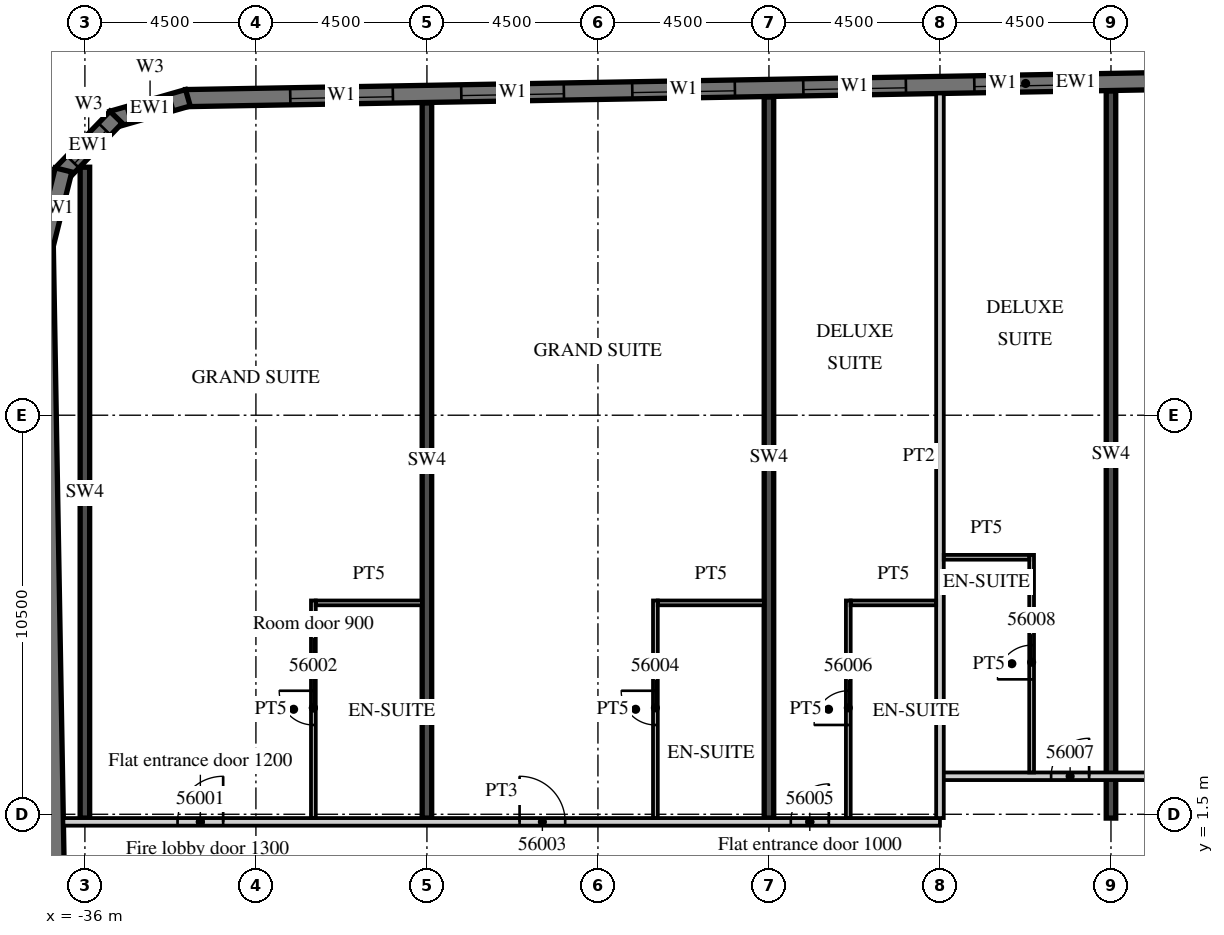
"""IFC4 building model, lengths in metres.
Left out: names, types, materials, properties, quantities, classifications, styles, units other than length and angle.
Written with IfcOpenShell. Run it as: python <this file> out.ifc"""

import sys

from ifc_helpers import new_model, si_unit, direction, frame, frame_2d, origin, place, context, subcontext, project, spatial, polyline, rectangle, outline, extrude, element, fill, save


model = new_model("IFC4")
c1 = context("Model", 3, precision=1e-05, world=origin(), true_north=direction((0.0, 1.0)))
c2 = subcontext(c1, "Body", "Model", "MODEL_VIEW")
j1 = project(units=[si_unit("LENGTHUNIT", "METRE"), si_unit("PLANEANGLEUNIT", "RADIAN")], contexts=[c1])
p1 = place(None, origin())
s1 = spatial("IfcSite", under=j1, at=p1, CompositionType="ELEMENT")
p2 = place(p1, origin())
s2 = spatial("IfcBuilding", under=s1, at=p2, CompositionType="ELEMENT")
p3 = place(p2, frame((0.0, 0.0, 230.9)))
s3 = spatial("IfcBuildingStorey", under=s2, at=p3, CompositionType="ELEMENT", Elevation=230.9)
p4 = place(p3, frame((-36.0, 1.4, 0.0), z_axis=(0.0, 0.0, 1.0), x_axis=(0.0, 1.0, 0.0)))
e1 = element("IfcWall", 1, at=p4, inside=s3, PredefinedType="SHEAR", context=c2, shape_type="SweptSolid", body=[
    extrude(rectangle(XDim=17.125, YDim=0.25, at=frame_2d((8.563, 0.0))), origin(), (0.0, 0.0, 1.0), 3.3),
])
p5 = place(p3, frame((-27.0, 1.4, 0.0), z_axis=(0.0, 0.0, 1.0), x_axis=(0.0, 1.0, 0.0)))
e2 = element("IfcWall", 2, at=p5, inside=s3, PredefinedType="SHEAR", context=c2, shape_type="SweptSolid", body=[
    extrude(rectangle(XDim=18.817, YDim=0.25, at=frame_2d((9.409, 0.0))), origin(), (0.0, 0.0, 1.0), 3.3),
])
p6 = place(p3, frame((-18.0, 1.4, 0.0), z_axis=(0.0, 0.0, 1.0), x_axis=(0.0, 1.0, 0.0)))
e3 = element("IfcWall", 3, at=p6, inside=s3, PredefinedType="SHEAR", context=c2, shape_type="SweptSolid", body=[
    extrude(rectangle(XDim=18.974, YDim=0.25, at=frame_2d((9.487, 0.0))), origin(), (0.0, 0.0, 1.0), 3.3),
])
p7 = place(p3, frame((-9.0, 1.4, 0.0), z_axis=(0.0, 0.0, 1.0), x_axis=(0.0, 1.0, 0.0)))
e4 = element("IfcWall", 4, at=p7, inside=s3, PredefinedType="SHEAR", context=c2, shape_type="SweptSolid", body=[
    extrude(rectangle(XDim=19.132, YDim=0.25, at=frame_2d((9.566, 0.0))), origin(), (0.0, 0.0, 1.0), 3.3),
])
p8 = place(p3, frame((-37.057, 16.503, 0.0), z_axis=(0.0, 0.0, 1.0), x_axis=(0.017452279857, -0.999847697366, 0.0)))
e5 = element("IfcWall", 5, at=p8, inside=s3, PredefinedType="SOLIDWALL", context=c2, shape_type="SweptSolid", body=[
    extrude(rectangle(XDim=33.0, YDim=0.45, at=frame_2d((16.5, 0.0))), origin(), (0.0, 0.0, 1.0), 3.02),
])
p9 = place(p3, frame((13.504, 21.161, 0.0), z_axis=(0.0, 0.0, 1.0), x_axis=(-0.999847763257, -0.017448504532, 0.0)))
e6 = element("IfcWall", 6, at=p9, inside=s3, PredefinedType="SOLIDWALL", context=c2, shape_type="SweptSolid", body=[
    extrude(rectangle(XDim=46.859, YDim=0.45, at=frame_2d((23.43, 0.0))), origin(), (0.0, 0.0, 1.0), 3.02),
])
p10 = place(p9, frame((0.9, 0.0, 0.45)))
e7 = element("IfcOpeningElement", 7, at=p10, cuts=e6, PredefinedType="OPENING", context=c2, shape_type="SweptSolid", body=[
    extrude(rectangle(XDim=2.7, YDim=2.25, at=frame_2d((1.35, 1.125))), frame((0.0, 0.235, 0.0), z_axis=(0.0, -1.0, 0.0), x_axis=(1.0, 0.0, 0.0)), (0.0, 0.0, 1.0), 0.47),
])
p11 = place(p9, frame((5.401, 0.0, 0.45)))
e8 = element("IfcOpeningElement", 8, at=p11, cuts=e6, PredefinedType="OPENING", context=c2, shape_type="SweptSolid", body=[
    extrude(rectangle(XDim=2.7, YDim=2.25, at=frame_2d((1.35, 1.125))), frame((0.0, 0.235, 0.0), z_axis=(0.0, -1.0, 0.0), x_axis=(1.0, 0.0, 0.0)), (0.0, 0.0, 1.0), 0.47),
])
p12 = place(p9, frame((9.902, 0.0, 0.45)))
e9 = element("IfcOpeningElement", 9, at=p12, cuts=e6, PredefinedType="OPENING", context=c2, shape_type="SweptSolid", body=[
    extrude(rectangle(XDim=2.7, YDim=2.25, at=frame_2d((1.35, 1.125))), frame((0.0, 0.235, 0.0), z_axis=(0.0, -1.0, 0.0), x_axis=(1.0, 0.0, 0.0)), (0.0, 0.0, 1.0), 0.47),
])
p13 = place(p9, frame((14.402, 0.0, 0.45)))
e10 = element("IfcOpeningElement", 10, at=p13, cuts=e6, PredefinedType="OPENING", context=c2, shape_type="SweptSolid", body=[
    extrude(rectangle(XDim=2.7, YDim=2.25, at=frame_2d((1.35, 1.125))), frame((0.0, 0.235, 0.0), z_axis=(0.0, -1.0, 0.0), x_axis=(1.0, 0.0, 0.0)), (0.0, 0.0, 1.0), 0.47),
])
p14 = place(p9, frame((18.903, 0.0, 0.45)))
e11 = element("IfcOpeningElement", 11, at=p14, cuts=e6, PredefinedType="OPENING", context=c2, shape_type="SweptSolid", body=[
    extrude(rectangle(XDim=2.7, YDim=2.25, at=frame_2d((1.35, 1.125))), frame((0.0, 0.235, 0.0), z_axis=(0.0, -1.0, 0.0), x_axis=(1.0, 0.0, 0.0)), (0.0, 0.0, 1.0), 0.47),
])
p15 = place(p9, frame((23.404, 0.0, 0.45)))
e12 = element("IfcOpeningElement", 12, at=p15, cuts=e6, PredefinedType="OPENING", context=c2, shape_type="SweptSolid", body=[
    extrude(rectangle(XDim=2.7, YDim=2.25, at=frame_2d((1.35, 1.125))), frame((0.0, 0.235, 0.0), z_axis=(0.0, -1.0, 0.0), x_axis=(1.0, 0.0, 0.0)), (0.0, 0.0, 1.0), 0.47),
])
p16 = place(p9, frame((27.904, 0.0, 0.45)))
e13 = element("IfcOpeningElement", 13, at=p16, cuts=e6, PredefinedType="OPENING", context=c2, shape_type="SweptSolid", body=[
    extrude(rectangle(XDim=2.7, YDim=2.25, at=frame_2d((1.35, 1.125))), frame((0.0, 0.235, 0.0), z_axis=(0.0, -1.0, 0.0), x_axis=(1.0, 0.0, 0.0)), (0.0, 0.0, 1.0), 0.47),
])
p17 = place(p9, frame((32.405, 0.0, 0.45)))
e14 = element("IfcOpeningElement", 14, at=p17, cuts=e6, PredefinedType="OPENING", context=c2, shape_type="SweptSolid", body=[
    extrude(rectangle(XDim=2.7, YDim=2.25, at=frame_2d((1.35, 1.125))), frame((0.0, 0.235, 0.0), z_axis=(0.0, -1.0, 0.0), x_axis=(1.0, 0.0, 0.0)), (0.0, 0.0, 1.0), 0.47),
])
p18 = place(p9, frame((36.906, 0.0, 0.45)))
e15 = element("IfcOpeningElement", 15, at=p18, cuts=e6, PredefinedType="OPENING", context=c2, shape_type="SweptSolid", body=[
    extrude(rectangle(XDim=2.7, YDim=2.25, at=frame_2d((1.35, 1.125))), frame((0.0, 0.235, 0.0), z_axis=(0.0, -1.0, 0.0), x_axis=(1.0, 0.0, 0.0)), (0.0, 0.0, 1.0), 0.47),
])
p19 = place(p9, frame((41.406, 0.0, 0.45)))
e16 = element("IfcOpeningElement", 16, at=p19, cuts=e6, PredefinedType="OPENING", context=c2, shape_type="SweptSolid", body=[
    extrude(rectangle(XDim=2.7, YDim=2.25, at=frame_2d((1.35, 1.125))), frame((0.0, 0.235, 0.0), z_axis=(0.0, -1.0, 0.0), x_axis=(1.0, 0.0, 0.0)), (0.0, 0.0, 1.0), 0.47),
])
p20 = place(p3, frame((-33.29, 20.352, 0.0), z_axis=(0.0, 0.0, 1.0), x_axis=(-0.961247584925, -0.275686562016, 0.0)))
e17 = element("IfcWall", 17, at=p20, inside=s3, PredefinedType="SOLIDWALL", context=c2, shape_type="SweptSolid", body=[
    extrude(outline(polyline([(0.0, -0.225), (2.071, -0.225), (1.95, 0.225), (0.121, 0.225), (0.0, -0.225)])), origin(), (0.0, 0.0, 1.0), 3.02),
])
p21 = place(p20, frame((0.435, 0.0, 0.45)))
e18 = element("IfcOpeningElement", 18, at=p21, cuts=e17, PredefinedType="OPENING", context=c2, shape_type="SweptSolid", body=[
    extrude(rectangle(XDim=1.2, YDim=2.25, at=frame_2d((0.6, 1.125))), frame((0.0, 0.235, 0.0), z_axis=(0.0, -1.0, 0.0), x_axis=(1.0, 0.0, 0.0)), (0.0, 0.0, 1.0), 0.47),
])
p22 = place(p3, frame((-35.181, 19.842, 0.0), z_axis=(0.0, 0.0, 1.0), x_axis=(-0.694678672846, -0.719320193998, 0.0)))
e19 = element("IfcWall", 19, at=p22, inside=s3, PredefinedType="SOLIDWALL", context=c2, shape_type="SweptSolid", body=[
    extrude(outline(polyline([(0.0, -0.225), (2.071, -0.225), (1.95, 0.225), (0.121, 0.225), (0.0, -0.225)])), origin(), (0.0, 0.0, 1.0), 3.02),
])
p23 = place(p22, frame((0.435, 0.0, 0.45)))
e20 = element("IfcOpeningElement", 20, at=p23, cuts=e19, PredefinedType="OPENING", context=c2, shape_type="SweptSolid", body=[
    extrude(rectangle(XDim=1.2, YDim=2.25, at=frame_2d((0.6, 1.125))), frame((0.0, 0.235, 0.0), z_axis=(0.0, -1.0, 0.0), x_axis=(1.0, 0.0, 0.0)), (0.0, 0.0, 1.0), 0.47),
])
p24 = place(p3, frame((-36.563, 18.454, 0.0), z_axis=(0.0, 0.0, 1.0), x_axis=(-0.241869623482, -0.970308757683, 0.0)))
e21 = element("IfcWall", 21, at=p24, inside=s3, PredefinedType="SOLIDWALL", context=c2, shape_type="SweptSolid", body=[
    extrude(outline(polyline([(-0.0, -0.225), (2.07, -0.225), (1.95, 0.225), (0.12, 0.225), (-0.0, -0.225)])), origin(), (0.0, 0.0, 1.0), 3.02),
])
p25 = place(p3, frame((-36.566, 1.3, 0.0), z_axis=(0.0, 0.0, 1.0), x_axis=(1.0, 0.0, 0.0)))
e22 = element("IfcWall", 22, at=p25, inside=s3, PredefinedType="PARTITIONING", context=c2, shape_type="SweptSolid", body=[
    extrude(rectangle(XDim=23.066, YDim=0.2, at=frame_2d((11.533, 0.0))), origin(), (0.0, 0.0, 1.0), 3.02),
])
p26 = place(p25, frame((3.004, 0.0, 0.0)))
e23 = element("IfcOpeningElement", 23, at=p26, cuts=e22, PredefinedType="OPENING", context=c2, shape_type="SweptSolid", body=[
    extrude(rectangle(XDim=1.2, YDim=2.1, at=frame_2d((0.6, 1.05))), frame((0.0, 0.11, 0.0), z_axis=(0.0, -1.0, 0.0), x_axis=(1.0, 0.0, 0.0)), (0.0, 0.0, 1.0), 0.22),
])
p27 = place(p25, frame((12.004, 0.0, 0.0)))
e24 = element("IfcOpeningElement", 24, at=p27, cuts=e22, PredefinedType="OPENING", context=c2, shape_type="SweptSolid", body=[
    extrude(rectangle(XDim=1.2, YDim=2.1, at=frame_2d((0.6, 1.05))), frame((0.0, 0.11, 0.0), z_axis=(0.0, -1.0, 0.0), x_axis=(1.0, 0.0, 0.0)), (0.0, 0.0, 1.0), 0.22),
])
p28 = place(p25, frame((19.141, 0.0, 0.0)))
e25 = element("IfcOpeningElement", 25, at=p28, cuts=e22, PredefinedType="OPENING", context=c2, shape_type="SweptSolid", body=[
    extrude(rectangle(XDim=1.0, YDim=2.1, at=frame_2d((0.5, 1.05))), frame((0.0, 0.11, 0.0), z_axis=(0.0, -1.0, 0.0), x_axis=(1.0, 0.0, 0.0)), (0.0, 0.0, 1.0), 0.22),
])
p29 = place(p3, frame((-13.5, 2.5, 0.0), z_axis=(0.0, 0.0, 1.0), x_axis=(1.0, 0.0, 0.0)))
e26 = element("IfcWall", 26, at=p29, inside=s3, PredefinedType="PARTITIONING", context=c2, shape_type="SweptSolid", body=[
    extrude(rectangle(XDim=27.0, YDim=0.2, at=frame_2d((13.5, 0.0))), origin(), (0.0, 0.0, 1.0), 3.02),
])
p30 = place(p29, frame((2.925, 0.0, 0.0)))
e27 = element("IfcOpeningElement", 27, at=p30, cuts=e26, PredefinedType="OPENING", context=c2, shape_type="SweptSolid", body=[
    extrude(rectangle(XDim=1.0, YDim=2.1, at=frame_2d((0.5, 1.05))), frame((0.0, 0.11, 0.0), z_axis=(0.0, -1.0, 0.0), x_axis=(1.0, 0.0, 0.0)), (0.0, 0.0, 1.0), 0.22),
])
p31 = place(p29, frame((6.938, 0.0, 0.0)))
e28 = element("IfcOpeningElement", 28, at=p31, cuts=e26, PredefinedType="OPENING", context=c2, shape_type="SweptSolid", body=[
    extrude(rectangle(XDim=1.2, YDim=2.1, at=frame_2d((0.6, 1.05))), frame((0.0, 0.11, 0.0), z_axis=(0.0, -1.0, 0.0), x_axis=(1.0, 0.0, 0.0)), (0.0, 0.0, 1.0), 0.22),
])
p32 = place(p29, frame((14.075, 0.0, 0.0)))
e29 = element("IfcOpeningElement", 29, at=p32, cuts=e26, PredefinedType="OPENING", context=c2, shape_type="SweptSolid", body=[
    extrude(rectangle(XDim=1.0, YDim=2.1, at=frame_2d((0.5, 1.05))), frame((0.0, 0.11, 0.0), z_axis=(0.0, -1.0, 0.0), x_axis=(1.0, 0.0, 0.0)), (0.0, 0.0, 1.0), 0.22),
])
p33 = place(p29, frame((20.925, 0.0, 0.0)))
e30 = element("IfcOpeningElement", 30, at=p33, cuts=e26, PredefinedType="OPENING", context=c2, shape_type="SweptSolid", body=[
    extrude(rectangle(XDim=1.0, YDim=2.1, at=frame_2d((0.5, 1.05))), frame((0.0, 0.11, 0.0), z_axis=(0.0, -1.0, 0.0), x_axis=(1.0, 0.0, 0.0)), (0.0, 0.0, 1.0), 0.22),
])
p34 = place(p29, frame((25.425, 0.0, 0.0)))
e31 = element("IfcOpeningElement", 31, at=p34, cuts=e26, PredefinedType="OPENING", context=c2, shape_type="SweptSolid", body=[
    extrude(rectangle(XDim=1.0, YDim=2.1, at=frame_2d((0.5, 1.05))), frame((0.0, 0.11, 0.0), z_axis=(0.0, -1.0, 0.0), x_axis=(1.0, 0.0, 0.0)), (0.0, 0.0, 1.0), 0.22),
])
p35 = place(p3, frame((-29.988, 1.4, 0.0), z_axis=(0.0, 0.0, 1.0), x_axis=(0.0, 1.0, 0.0)))
e32 = element("IfcWall", 32, at=p35, inside=s3, PredefinedType="PARTITIONING", context=c2, shape_type="SweptSolid", body=[
    extrude(rectangle(XDim=5.725, YDim=0.125, at=frame_2d((2.863, 0.0))), origin(), (0.0, 0.0, 1.0), 3.02),
])
p36 = place(p35, frame((2.45, 0.0, 0.0)))
e33 = element("IfcOpeningElement", 33, at=p36, cuts=e32, PredefinedType="OPENING", context=c2, shape_type="SweptSolid", body=[
    extrude(rectangle(XDim=0.9, YDim=2.1, at=frame_2d((0.45, 1.05))), frame((0.0, 0.073, 0.0), z_axis=(0.0, -1.0, 0.0), x_axis=(1.0, 0.0, 0.0)), (0.0, 0.0, 1.0), 0.145),
])
p37 = place(p3, frame((-29.925, 7.062, 0.0), z_axis=(0.0, 0.0, 1.0), x_axis=(1.0, 0.0, 0.0)))
e34 = element("IfcWall", 34, at=p37, inside=s3, PredefinedType="PARTITIONING", context=c2, shape_type="SweptSolid", body=[
    extrude(rectangle(XDim=2.8, YDim=0.125, at=frame_2d((1.4, 0.0))), origin(), (0.0, 0.0, 1.0), 3.02),
])
p38 = place(p3, frame((-20.988, 1.4, 0.0), z_axis=(0.0, 0.0, 1.0), x_axis=(0.0, 1.0, 0.0)))
e35 = element("IfcWall", 35, at=p38, inside=s3, PredefinedType="PARTITIONING", context=c2, shape_type="SweptSolid", body=[
    extrude(rectangle(XDim=5.725, YDim=0.125, at=frame_2d((2.863, 0.0))), origin(), (0.0, 0.0, 1.0), 3.02),
])
p39 = place(p38, frame((2.45, 0.0, 0.0)))
e36 = element("IfcOpeningElement", 36, at=p39, cuts=e35, PredefinedType="OPENING", context=c2, shape_type="SweptSolid", body=[
    extrude(rectangle(XDim=0.9, YDim=2.1, at=frame_2d((0.45, 1.05))), frame((0.0, 0.073, 0.0), z_axis=(0.0, -1.0, 0.0), x_axis=(1.0, 0.0, 0.0)), (0.0, 0.0, 1.0), 0.145),
])
p40 = place(p3, frame((-20.925, 7.062, 0.0), z_axis=(0.0, 0.0, 1.0), x_axis=(1.0, 0.0, 0.0)))
e37 = element("IfcWall", 37, at=p40, inside=s3, PredefinedType="PARTITIONING", context=c2, shape_type="SweptSolid", body=[
    extrude(rectangle(XDim=2.8, YDim=0.125, at=frame_2d((1.4, 0.0))), origin(), (0.0, 0.0, 1.0), 3.02),
])
p41 = place(p3, frame((-13.5, 1.4, 0.0), z_axis=(0.0, 0.0, 1.0), x_axis=(0.0, 1.0, 0.0)))
e38 = element("IfcWall", 38, at=p41, inside=s3, PredefinedType="PARTITIONING", context=c2, shape_type="SweptSolid", body=[
    extrude(rectangle(XDim=19.065, YDim=0.2, at=frame_2d((9.533, 0.0))), origin(), (0.0, 0.0, 1.0), 3.02),
])
p42 = place(p3, frame((-15.912, 1.4, 0.0), z_axis=(0.0, 0.0, 1.0), x_axis=(0.0, 1.0, 0.0)))
e39 = element("IfcWall", 39, at=p42, inside=s3, PredefinedType="PARTITIONING", context=c2, shape_type="SweptSolid", body=[
    extrude(rectangle(XDim=5.725, YDim=0.125, at=frame_2d((2.863, 0.0))), origin(), (0.0, 0.0, 1.0), 3.02),
])
p43 = place(p42, frame((2.45, 0.0, 0.0)))
e40 = element("IfcOpeningElement", 40, at=p43, cuts=e39, PredefinedType="OPENING", context=c2, shape_type="SweptSolid", body=[
    extrude(rectangle(XDim=0.9, YDim=2.1, at=frame_2d((0.45, 1.05))), frame((0.0, 0.073, 0.0), z_axis=(0.0, -1.0, 0.0), x_axis=(1.0, 0.0, 0.0)), (0.0, 0.0, 1.0), 0.145),
])
p44 = place(p3, frame((-15.85, 7.062, 0.0), z_axis=(0.0, 0.0, 1.0), x_axis=(1.0, 0.0, 0.0)))
e41 = element("IfcWall", 41, at=p44, inside=s3, PredefinedType="PARTITIONING", context=c2, shape_type="SweptSolid", body=[
    extrude(rectangle(XDim=2.25, YDim=0.125, at=frame_2d((1.125, 0.0))), origin(), (0.0, 0.0, 1.0), 3.02),
])
p45 = place(p3, frame((-11.088, 2.6, 0.0), z_axis=(0.0, 0.0, 1.0), x_axis=(0.0, 1.0, 0.0)))
e42 = element("IfcWall", 42, at=p45, inside=s3, PredefinedType="PARTITIONING", context=c2, shape_type="SweptSolid", body=[
    extrude(rectangle(XDim=5.725, YDim=0.125, at=frame_2d((2.862, 0.0))), origin(), (0.0, 0.0, 1.0), 3.02),
])
p46 = place(p45, frame((2.45, 0.0, 0.0)))
e43 = element("IfcOpeningElement", 43, at=p46, cuts=e42, PredefinedType="OPENING", context=c2, shape_type="SweptSolid", body=[
    extrude(rectangle(XDim=0.9, YDim=2.1, at=frame_2d((0.45, 1.05))), frame((0.0, 0.073, 0.0), z_axis=(0.0, -1.0, 0.0), x_axis=(1.0, 0.0, 0.0)), (0.0, 0.0, 1.0), 0.145),
])
p47 = place(p3, frame((-13.4, 8.262, 0.0), z_axis=(0.0, 0.0, 1.0), x_axis=(1.0, 0.0, 0.0)))
e44 = element("IfcWall", 44, at=p47, inside=s3, PredefinedType="PARTITIONING", context=c2, shape_type="SweptSolid", body=[
    extrude(rectangle(XDim=2.25, YDim=0.125, at=frame_2d((1.125, 0.0))), origin(), (0.0, 0.0, 1.0), 3.02),
])
p48 = place(p15, origin())
e45 = element("IfcWindow", 45, at=p48, inside=s3, PartitioningType="SINGLE_PANEL", PredefinedType="WINDOW", context=c2, shape_type="SweptSolid", body=[
    extrude(rectangle(XDim=2.7, YDim=2.25, at=frame_2d((1.35, 1.125))), frame((0.0, 0.09, 0.0), z_axis=(0.0, -1.0, 0.0), x_axis=(1.0, 0.0, 0.0)), (0.0, 0.0, 1.0), 0.06),
])
fill(e12, e45)
p49 = place(p16, origin())
e46 = element("IfcWindow", 46, at=p49, inside=s3, PartitioningType="SINGLE_PANEL", PredefinedType="WINDOW", context=c2, shape_type="SweptSolid", body=[
    extrude(rectangle(XDim=2.7, YDim=2.25, at=frame_2d((1.35, 1.125))), frame((0.0, 0.09, 0.0), z_axis=(0.0, -1.0, 0.0), x_axis=(1.0, 0.0, 0.0)), (0.0, 0.0, 1.0), 0.06),
])
fill(e13, e46)
p50 = place(p17, origin())
e47 = element("IfcWindow", 47, at=p50, inside=s3, PartitioningType="SINGLE_PANEL", PredefinedType="WINDOW", context=c2, shape_type="SweptSolid", body=[
    extrude(rectangle(XDim=2.7, YDim=2.25, at=frame_2d((1.35, 1.125))), frame((0.0, 0.09, 0.0), z_axis=(0.0, -1.0, 0.0), x_axis=(1.0, 0.0, 0.0)), (0.0, 0.0, 1.0), 0.06),
])
fill(e14, e47)
p51 = place(p18, origin())
e48 = element("IfcWindow", 48, at=p51, inside=s3, PartitioningType="SINGLE_PANEL", PredefinedType="WINDOW", context=c2, shape_type="SweptSolid", body=[
    extrude(rectangle(XDim=2.7, YDim=2.25, at=frame_2d((1.35, 1.125))), frame((0.0, 0.09, 0.0), z_axis=(0.0, -1.0, 0.0), x_axis=(1.0, 0.0, 0.0)), (0.0, 0.0, 1.0), 0.06),
])
fill(e15, e48)
p52 = place(p19, origin())
e49 = element("IfcWindow", 49, at=p52, inside=s3, PartitioningType="SINGLE_PANEL", PredefinedType="WINDOW", context=c2, shape_type="SweptSolid", body=[
    extrude(rectangle(XDim=2.7, YDim=2.25, at=frame_2d((1.35, 1.125))), frame((0.0, 0.09, 0.0), z_axis=(0.0, -1.0, 0.0), x_axis=(1.0, 0.0, 0.0)), (0.0, 0.0, 1.0), 0.06),
])
fill(e16, e49)
p53 = place(p21, origin())
e50 = element("IfcWindow", 50, at=p53, inside=s3, PartitioningType="SINGLE_PANEL", PredefinedType="WINDOW", context=c2, shape_type="SweptSolid", body=[
    extrude(rectangle(XDim=1.2, YDim=2.25, at=frame_2d((0.6, 1.125))), frame((0.0, 0.09, 0.0), z_axis=(0.0, -1.0, 0.0), x_axis=(1.0, 0.0, 0.0)), (0.0, 0.0, 1.0), 0.06),
])
fill(e18, e50)
p54 = place(p23, origin())
e51 = element("IfcWindow", 51, at=p54, inside=s3, PartitioningType="SINGLE_PANEL", PredefinedType="WINDOW", context=c2, shape_type="SweptSolid", body=[
    extrude(rectangle(XDim=1.2, YDim=2.25, at=frame_2d((0.6, 1.125))), frame((0.0, 0.09, 0.0), z_axis=(0.0, -1.0, 0.0), x_axis=(1.0, 0.0, 0.0)), (0.0, 0.0, 1.0), 0.06),
])
fill(e20, e51)
p55 = place(p26, origin())
e52 = element("IfcDoor", 52, at=p55, inside=s3, OperationType="SINGLE_SWING_RIGHT", PredefinedType="DOOR", context=c2, shape_type="SweptSolid", body=[
    extrude(rectangle(XDim=1.2, YDim=2.1, at=frame_2d((0.6, 1.05))), frame((0.0, 0.025, 0.0), z_axis=(0.0, -1.0, 0.0), x_axis=(1.0, 0.0, 0.0)), (0.0, 0.0, 1.0), 0.05),
])
fill(e23, e52)
p56 = place(p36, origin())
e53 = element("IfcDoor", 53, at=p56, inside=s3, OperationType="SINGLE_SWING_RIGHT", PredefinedType="DOOR", context=c2, shape_type="SweptSolid", body=[
    extrude(rectangle(XDim=0.9, YDim=2.1, at=frame_2d((0.45, 1.05))), frame((0.0, 0.025, 0.0), z_axis=(0.0, -1.0, 0.0), x_axis=(1.0, 0.0, 0.0)), (0.0, 0.0, 1.0), 0.05),
])
fill(e33, e53)
p57 = place(p27, origin())
e54 = element("IfcDoor", 54, at=p57, inside=s3, OperationType="SINGLE_SWING_LEFT", PredefinedType="DOOR", context=c2, shape_type="SweptSolid", body=[
    extrude(rectangle(XDim=1.2, YDim=2.1, at=frame_2d((0.6, 1.05))), frame((0.0, 0.025, 0.0), z_axis=(0.0, -1.0, 0.0), x_axis=(1.0, 0.0, 0.0)), (0.0, 0.0, 1.0), 0.05),
])
fill(e24, e54)
p58 = place(p39, origin())
e55 = element("IfcDoor", 55, at=p58, inside=s3, OperationType="SINGLE_SWING_RIGHT", PredefinedType="DOOR", context=c2, shape_type="SweptSolid", body=[
    extrude(rectangle(XDim=0.9, YDim=2.1, at=frame_2d((0.45, 1.05))), frame((0.0, 0.025, 0.0), z_axis=(0.0, -1.0, 0.0), x_axis=(1.0, 0.0, 0.0)), (0.0, 0.0, 1.0), 0.05),
])
fill(e36, e55)
p59 = place(p28, origin())
e56 = element("IfcDoor", 56, at=p59, inside=s3, OperationType="SINGLE_SWING_RIGHT", PredefinedType="DOOR", context=c2, shape_type="SweptSolid", body=[
    extrude(rectangle(XDim=1.0, YDim=2.1, at=frame_2d((0.5, 1.05))), frame((0.0, 0.025, 0.0), z_axis=(0.0, -1.0, 0.0), x_axis=(1.0, 0.0, 0.0)), (0.0, 0.0, 1.0), 0.05),
])
fill(e25, e56)
p60 = place(p43, origin())
e57 = element("IfcDoor", 57, at=p60, inside=s3, OperationType="SINGLE_SWING_LEFT", PredefinedType="DOOR", context=c2, shape_type="SweptSolid", body=[
    extrude(rectangle(XDim=0.9, YDim=2.1, at=frame_2d((0.45, 1.05))), frame((0.0, 0.025, 0.0), z_axis=(0.0, -1.0, 0.0), x_axis=(1.0, 0.0, 0.0)), (0.0, 0.0, 1.0), 0.05),
])
fill(e40, e57)
p61 = place(p30, origin())
e58 = element("IfcDoor", 58, at=p61, inside=s3, OperationType="SINGLE_SWING_RIGHT", PredefinedType="DOOR", context=c2, shape_type="SweptSolid", body=[
    extrude(rectangle(XDim=1.0, YDim=2.1, at=frame_2d((0.5, 1.05))), frame((0.0, 0.025, 0.0), z_axis=(0.0, -1.0, 0.0), x_axis=(1.0, 0.0, 0.0)), (0.0, 0.0, 1.0), 0.05),
])
fill(e27, e58)
p62 = place(p46, origin())
e59 = element("IfcDoor", 59, at=p62, inside=s3, OperationType="SINGLE_SWING_LEFT", PredefinedType="DOOR", context=c2, shape_type="SweptSolid", body=[
    extrude(rectangle(XDim=0.9, YDim=2.1, at=frame_2d((0.45, 1.05))), frame((0.0, 0.025, 0.0), z_axis=(0.0, -1.0, 0.0), x_axis=(1.0, 0.0, 0.0)), (0.0, 0.0, 1.0), 0.05),
])
fill(e43, e59)
save(model, sys.argv[1])
